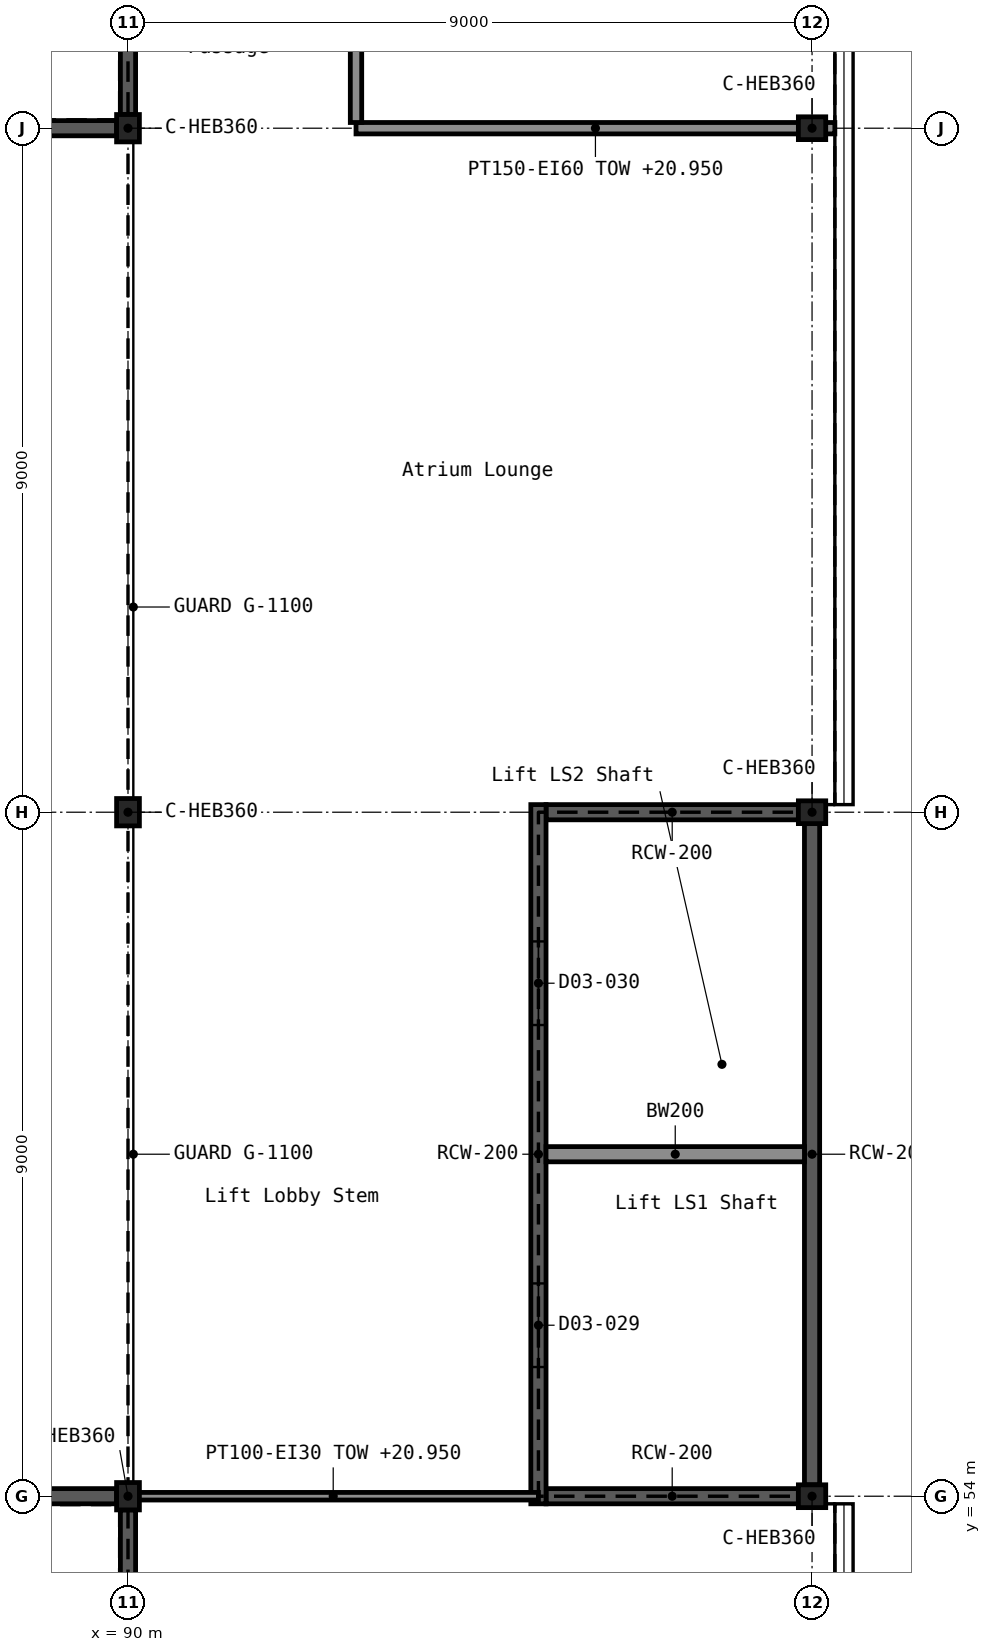
"""IFC4 building model, lengths in metres.
Left out: names, types, materials, properties, quantities, classifications, styles, units other than length and angle.
Written with IfcOpenShell. Run it as: python <this file> out.ifc"""

import sys

from ifc_helpers import new_model, si_unit, direction, frame, frame_2d, origin, origin_2d, place, context, subcontext, project, spatial, rectangle, i_section, extrude, element, fill, save


model = new_model("IFC4")
c1 = context("Model", 3, precision=1e-05, world=origin(), true_north=direction((0.0, 1.0)))
c2 = subcontext(c1, "Body", "Model", "MODEL_VIEW")
j1 = project(units=[si_unit("LENGTHUNIT", "METRE"), si_unit("PLANEANGLEUNIT", "RADIAN")], contexts=[c1])
p1 = place(None, origin())
s1 = spatial("IfcSite", under=j1, at=p1, CompositionType="ELEMENT")
p2 = place(p1, origin())
s2 = spatial("IfcBuilding", under=s1, at=p2, CompositionType="ELEMENT")
p3 = place(p2, frame((0.0, 0.0, 16.2)))
s3 = spatial("IfcBuildingStorey", under=s2, at=p3, CompositionType="ELEMENT", Elevation=16.2)
for number, where, z_axis, x_axis in (
    (1, (90.0, 54.0, 0.0), (0.0, 0.0, 1.0), (1.0, 0.0, 0.0)),
    (2, (99.0, 54.0, 0.0), (0.0, 0.0, 1.0), (0.0, 1.0, 0.0)),
    (3, (90.0, 63.0, 0.0), (0.0, 0.0, 1.0), (1.0, 0.0, 0.0)),
    (4, (99.0, 63.0, 0.0), (0.0, 0.0, 1.0), (0.0, 1.0, 0.0)),
    (5, (90.0, 72.0, 0.0), (0.0, 0.0, 1.0), (1.0, 0.0, 0.0)),
    (6, (99.0, 72.0, 0.0), (0.0, 0.0, 1.0), (0.0, 1.0, 0.0)),
):
    element("IfcColumn", number, at=place(p3, frame(where, z_axis=z_axis, x_axis=x_axis)), inside=s3, PredefinedType="COLUMN", context=c2, shape_type="SweptSolid", body=[
        extrude(i_section(OverallWidth=0.3, OverallDepth=0.36, WebThickness=0.012, FlangeThickness=0.022, FilletRadius=0.027, at=origin_2d()), origin(), (0.0, 0.0, 1.0), 5.4),
    ])
p4 = place(p3, frame((81.15, 54.0, 0.0), z_axis=(0.0, 0.0, 1.0), x_axis=(1.0, 0.0, 0.0)))
e7 = element("IfcWall", 7, at=p4, inside=s3, PredefinedType="SHEAR", context=c2, shape_type="SweptSolid", body=[
    extrude(rectangle(XDim=8.7, YDim=0.2, at=frame_2d((4.35, 0.0))), origin(), (0.0, 0.0, 1.0), 5.4),
])
p5 = place(p3, frame((90.0, 45.18, 0.0), z_axis=(0.0, 0.0, 1.0), x_axis=(0.0, 1.0, 0.0)))
e8 = element("IfcWall", 8, at=p5, inside=s3, PredefinedType="SHEAR", context=c2, shape_type="SweptSolid", body=[
    extrude(rectangle(XDim=8.64, YDim=0.2, at=frame_2d((4.32, 0.0))), origin(), (0.0, 0.0, 1.0), 5.4),
])
p6 = place(p3, frame((81.15, 72.0, 0.0), z_axis=(0.0, 0.0, 1.0), x_axis=(1.0, 0.0, 0.0)))
e9 = element("IfcWall", 9, at=p6, inside=s3, PredefinedType="SHEAR", context=c2, shape_type="SweptSolid", body=[
    extrude(rectangle(XDim=8.7, YDim=0.2, at=frame_2d((4.35, 0.0))), origin(), (0.0, 0.0, 1.0), 5.4),
])
p7 = place(p3, frame((90.0, 72.18, 0.0), z_axis=(0.0, 0.0, 1.0), x_axis=(0.0, 1.0, 0.0)))
e10 = element("IfcWall", 10, at=p7, inside=s3, PredefinedType="SHEAR", context=c2, shape_type="SweptSolid", body=[
    extrude(rectangle(XDim=8.64, YDim=0.2, at=frame_2d((4.32, 0.0))), origin(), (0.0, 0.0, 1.0), 5.4),
])
for number, where, z_axis, x_axis in (
    (11, (95.5, 54.0, 0.0), (0.0, 0.0, 1.0), (1.0, 0.0, 0.0)),
    (12, (95.5, 63.0, 0.0), (0.0, 0.0, 1.0), (1.0, 0.0, 0.0)),
):
    element("IfcWall", number, at=place(p3, frame(where, z_axis=z_axis, x_axis=x_axis)), inside=s3, PredefinedType="SHEAR", context=c2, shape_type="SweptSolid", body=[
        extrude(rectangle(XDim=3.32, YDim=0.2, at=frame_2d((1.66, 0.0))), origin(), (0.0, 0.0, 1.0), 5.4),
    ])
p8 = place(p3, frame((95.4, 53.9, 0.0), z_axis=(0.0, 0.0, 1.0), x_axis=(0.0, 1.0, 0.0)))
e13 = element("IfcWall", 13, at=p8, inside=s3, PredefinedType="SHEAR", context=c2, shape_type="SweptSolid", body=[
    extrude(rectangle(XDim=9.2, YDim=0.2, at=frame_2d((4.6, 0.0))), origin(), (0.0, 0.0, 1.0), 5.4),
])
p9 = place(p8, frame((1.8, 0.0, 0.0)))
e14 = element("IfcOpeningElement", 14, at=p9, cuts=e13, PredefinedType="OPENING", context=c2, shape_type="SweptSolid", body=[
    extrude(rectangle(XDim=1.1, YDim=2.1, at=frame_2d((0.55, 1.05))), frame((0.0, 0.111, 0.0), z_axis=(0.0, -1.0, 0.0), x_axis=(1.0, 0.0, 0.0)), (0.0, 0.0, 1.0), 0.222),
])
p10 = place(p8, frame((6.3, 0.0, 0.0)))
e15 = element("IfcOpeningElement", 15, at=p10, cuts=e13, PredefinedType="OPENING", context=c2, shape_type="SweptSolid", body=[
    extrude(rectangle(XDim=1.1, YDim=2.1, at=frame_2d((0.55, 1.05))), frame((0.0, 0.111, 0.0), z_axis=(0.0, -1.0, 0.0), x_axis=(1.0, 0.0, 0.0)), (0.0, 0.0, 1.0), 0.222),
])
p11 = place(p3, frame((99.0, 54.15, 0.0), z_axis=(0.0, 0.0, 1.0), x_axis=(0.0, 1.0, 0.0)))
e16 = element("IfcWall", 16, at=p11, inside=s3, PredefinedType="SHEAR", context=c2, shape_type="SweptSolid", body=[
    extrude(rectangle(XDim=8.7, YDim=0.2, at=frame_2d((4.35, 0.0))), origin(), (0.0, 0.0, 1.0), 5.4),
])
p12 = place(p3, frame((95.5, 58.5, 0.0), z_axis=(0.0, 0.0, 1.0), x_axis=(1.0, 0.0, 0.0)))
e17 = element("IfcWall", 17, at=p12, inside=s3, PredefinedType="SOLIDWALL", context=c2, shape_type="SweptSolid", body=[
    extrude(rectangle(XDim=3.4, YDim=0.2, at=frame_2d((1.7, 0.0))), origin(), (0.0, 0.0, 1.0), 5.4),
])
p13 = place(p3, frame((93.0, 72.0, 0.0), z_axis=(0.0, 0.0, 1.0), x_axis=(1.0, 0.0, 0.0)))
e18 = element("IfcWall", 18, at=p13, inside=s3, PredefinedType="PARTITIONING", context=c2, shape_type="SweptSolid", body=[
    extrude(rectangle(XDim=6.3, YDim=0.15, at=frame_2d((3.15, 0.0))), origin(), (0.0, 0.0, 1.0), 4.75),
])
p14 = place(p3, frame((93.0, 72.075, 0.0), z_axis=(0.0, 0.0, 1.0), x_axis=(0.0, 1.0, 0.0)))
e19 = element("IfcWall", 19, at=p14, inside=s3, PredefinedType="PARTITIONING", context=c2, shape_type="SweptSolid", body=[
    extrude(rectangle(XDim=8.85, YDim=0.15, at=frame_2d((4.425, 0.0))), origin(), (0.0, 0.0, 1.0), 4.89),
])
p15 = place(p14, frame((3.525, 0.0, 0.0)))
e20 = element("IfcOpeningElement", 20, at=p15, cuts=e19, PredefinedType="OPENING", context=c2, shape_type="SweptSolid", body=[
    extrude(rectangle(XDim=1.8, YDim=3.0, at=frame_2d((0.9, 1.5))), frame((0.0, 0.086, 0.0), z_axis=(0.0, -1.0, 0.0), x_axis=(1.0, 0.0, 0.0)), (0.0, 0.0, 1.0), 0.172),
])
p16 = place(p3, frame((90.0, 54.0, 0.0), z_axis=(0.0, 0.0, 1.0), x_axis=(1.0, 0.0, 0.0)))
e21 = element("IfcWall", 21, at=p16, inside=s3, PredefinedType="PARTITIONING", context=c2, shape_type="SweptSolid", body=[
    extrude(rectangle(XDim=5.4, YDim=0.1, at=frame_2d((2.7, 0.0))), origin(), (0.0, 0.0, 1.0), 4.75),
])
p17 = place(p9, origin())
e22 = element("IfcDoor", 22, at=p17, inside=s3, OperationType="DOUBLE_DOOR_SLIDING", PredefinedType="DOOR", context=c2, shape_type="SweptSolid", body=[
    extrude(rectangle(XDim=1.1, YDim=2.1, at=frame_2d((0.55, 1.05))), frame((0.0, 0.025, 0.0), z_axis=(0.0, -1.0, 0.0), x_axis=(1.0, 0.0, 0.0)), (0.0, 0.0, 1.0), 0.05),
])
fill(e14, e22)
p18 = place(p10, origin())
e23 = element("IfcDoor", 23, at=p18, inside=s3, OperationType="DOUBLE_DOOR_SLIDING", PredefinedType="DOOR", context=c2, shape_type="SweptSolid", body=[
    extrude(rectangle(XDim=1.1, YDim=2.1, at=frame_2d((0.55, 1.05))), frame((0.0, 0.025, 0.0), z_axis=(0.0, -1.0, 0.0), x_axis=(1.0, 0.0, 0.0)), (0.0, 0.0, 1.0), 0.05),
])
fill(e15, e23)
save(model, sys.argv[1])
